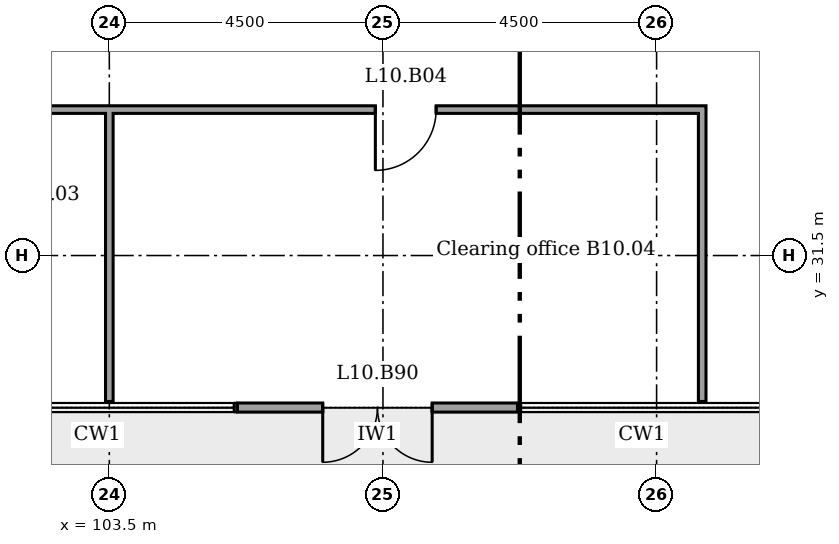
"""IFC4 building model, lengths in metres.
Left out: names, types, materials, properties, quantities, classifications, styles, units other than length and angle.
Written with IfcOpenShell. Run it as: python <this file> out.ifc"""

import sys

from ifc_helpers import new_model, si_unit, direction, frame, frame_2d, origin, place, context, subcontext, project, spatial, rectangle, extrude, element, fill, save


model = new_model("IFC4")
c1 = context("Model", 3, precision=1e-05, world=origin(), true_north=direction((0.0, 1.0)))
c2 = subcontext(c1, "Body", "Model", "MODEL_VIEW")
j1 = project(units=[si_unit("LENGTHUNIT", "METRE"), si_unit("PLANEANGLEUNIT", "RADIAN")], contexts=[c1])
p1 = place(None, origin())
s1 = spatial("IfcSite", under=j1, at=p1, CompositionType="ELEMENT")
p2 = place(p1, origin())
s2 = spatial("IfcBuilding", under=s1, at=p2, CompositionType="ELEMENT")
p3 = place(p2, frame((0.0, 0.0, 47.4)))
s3 = spatial("IfcBuildingStorey", under=s2, at=p3, CompositionType="ELEMENT", Elevation=47.4)
p4 = place(p3, frame((105.606, 29.0, 0.0)))
e1 = element("IfcWall", 1, at=p4, inside=s3, PredefinedType="SOLIDWALL", context=c2, shape_type="SweptSolid", body=[
    extrude(rectangle(XDim=4.606, YDim=0.15, at=frame_2d((2.303, 0.0))), origin(), (0.0, 0.0, 1.0), 3.45),
])
p5 = place(p4, frame((1.403, 0.0, 0.0)))
e2 = element("IfcOpeningElement", 2, at=p5, cuts=e1, PredefinedType="OPENING", context=c2, shape_type="SweptSolid", body=[
    extrude(rectangle(XDim=1.8, YDim=2.4, at=frame_2d((0.9, 1.2))), frame((0.0, 0.085, 0.0), z_axis=(0.0, -1.0, 0.0), x_axis=(1.0, 0.0, 0.0)), (0.0, 0.0, 1.0), 0.17),
])
p6 = place(p3, frame((100.738, 33.9, 0.0)))
e3 = element("IfcWall", 3, at=p6, inside=s3, PredefinedType="PARTITIONING", context=c2, shape_type="SweptSolid", body=[
    extrude(rectangle(XDim=12.575, YDim=0.125, at=frame_2d((6.288, 0.0))), origin(), (0.0, 0.0, 1.0), 3.45),
])
p7 = place(p6, frame((7.137, 0.0, 0.0)))
e4 = element("IfcOpeningElement", 4, at=p7, cuts=e3, PredefinedType="OPENING", context=c2, shape_type="SweptSolid", body=[
    extrude(rectangle(XDim=1.0, YDim=2.1, at=frame_2d((0.5, 1.05))), frame((0.0, 0.073, 0.0), z_axis=(0.0, -1.0, 0.0), x_axis=(1.0, 0.0, 0.0)), (0.0, 0.0, 1.0), 0.145),
])
p8 = place(p3, frame((103.5, 29.1, 0.0), z_axis=(0.0, 0.0, 1.0), x_axis=(0.0, 1.0, 0.0)))
e5 = element("IfcWall", 5, at=p8, inside=s3, PredefinedType="PARTITIONING", context=c2, shape_type="SweptSolid", body=[
    extrude(rectangle(XDim=4.8, YDim=0.125, at=frame_2d((2.4, 0.0))), origin(), (0.0, 0.0, 1.0), 2.851),
])
p9 = place(p3, frame((113.25, 29.1, 0.0), z_axis=(0.0, 0.0, 1.0), x_axis=(0.0, 1.0, 0.0)))
e6 = element("IfcWall", 6, at=p9, inside=s3, PredefinedType="PARTITIONING", context=c2, shape_type="SweptSolid", body=[
    extrude(rectangle(XDim=4.737, YDim=0.125, at=frame_2d((2.369, 0.0))), origin(), (0.0, 0.0, 1.0), 3.45),
])
p10 = place(p5, frame((1.8, 0.0, 0.0), x_axis=(-1.0, 0.0, 0.0)))
e7 = element("IfcDoor", 7, at=p10, inside=s3, OperationType="DOUBLE_DOOR_DOUBLE_SWING", PredefinedType="NOTDEFINED", context=c2, shape_type="SweptSolid", body=[
    extrude(rectangle(XDim=1.8, YDim=2.4, at=frame_2d((0.9, 1.2))), frame((0.0, 0.025, 0.0), z_axis=(0.0, -1.0, 0.0), x_axis=(1.0, 0.0, 0.0)), (0.0, 0.0, 1.0), 0.05),
])
fill(e2, e7)
p11 = place(p7, frame((1.0, 0.0, 0.0), x_axis=(-1.0, 0.0, 0.0)))
e8 = element("IfcDoor", 8, at=p11, inside=s3, OperationType="SINGLE_SWING_LEFT", PredefinedType="DOOR", context=c2, shape_type="SweptSolid", body=[
    extrude(rectangle(XDim=1.0, YDim=2.1, at=frame_2d((0.5, 1.05))), frame((0.0, 0.025, 0.0), z_axis=(0.0, -1.0, 0.0), x_axis=(1.0, 0.0, 0.0)), (0.0, 0.0, 1.0), 0.05),
])
fill(e4, e8)
save(model, sys.argv[1])
